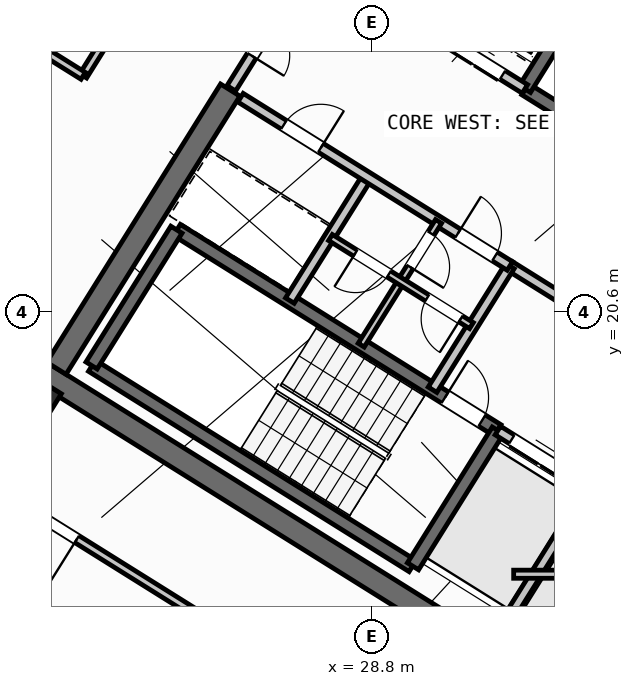
"""IFC4 building model, lengths in metres.
Left out: names, types, materials, properties, quantities, classifications, styles, units other than length and angle.
Written with IfcOpenShell. Run it as: python <this file> out.ifc"""

import sys

from ifc_helpers import new_model, si_unit, direction, frame, frame_2d, origin, origin_2d, place, context, subcontext, project, spatial, rectangle, hollow_rectangle, extrude, source, transform, mapped, element, fill, save


model = new_model("IFC4")
c1 = context("Model", 3, precision=1e-05, world=origin(), true_north=direction((0.0, 1.0)))
c2 = subcontext(c1, "Body", "Model", "MODEL_VIEW")
j1 = project(units=[si_unit("LENGTHUNIT", "METRE"), si_unit("PLANEANGLEUNIT", "RADIAN")], contexts=[c1])
p1 = place(None, origin())
s1 = spatial("IfcSite", under=j1, at=p1, CompositionType="ELEMENT")
p2 = place(p1, origin())
s2 = spatial("IfcBuilding", under=s1, at=p2, CompositionType="ELEMENT")
p3 = place(p2, frame((0.0, 0.0, 295.2)))
s3 = spatial("IfcBuildingStorey", under=s2, at=p3, CompositionType="ELEMENT", Elevation=295.2)
p4 = place(p3, frame((40.531, 24.036, 0.0), z_axis=(0.0, 0.0, 1.0), x_axis=(-0.848048787466, 0.529918157905, 0.0)))
e1 = element("IfcWall", 1, at=p4, inside=s3, PredefinedType="SHEAR", context=c2, shape_type="SweptSolid", body=[
    extrude(rectangle(XDim=13.04, YDim=0.45, at=frame_2d((6.52, 0.0))), origin(), (0.0, 0.0, 1.0), 3.32),
])
p5 = place(p3, frame((33.324, 12.503, 0.0), z_axis=(0.0, 0.0, 1.0), x_axis=(-0.848043529849, 0.529926571782, 0.0)))
e2 = element("IfcWall", 2, at=p5, inside=s3, PredefinedType="SHEAR", context=c2, shape_type="SweptSolid", body=[
    extrude(rectangle(XDim=13.04, YDim=0.45, at=frame_2d((6.52, 0.0))), origin(), (0.0, 0.0, 1.0), 3.32),
])
p6 = place(p3, frame((26.007, 24.976, 0.0), z_axis=(0.0, 0.0, 1.0), x_axis=(-0.529931155655, -0.848040665456, 0.0)))
e3 = element("IfcWall", 3, at=p6, inside=s3, PredefinedType="SHEAR", context=c2, shape_type="SweptSolid", body=[
    extrude(rectangle(XDim=6.475, YDim=0.45, at=frame_2d((3.238, 0.0))), origin(), (0.0, 0.0, 1.0), 3.32),
])
m1 = source(origin(), c2, "Body", "SweptSolid", [
    extrude(hollow_rectangle(XDim=0.7, YDim=0.7, WallThickness=0.028, at=origin_2d()), origin(), (0.0, 0.0, 1.0), 3.6),
])
p7 = place(p3, frame((22.191, 18.87, 0.0), z_axis=(0.0, 0.0, 1.0), x_axis=(-0.848048096156, 0.529919264233, 0.0)))
e4 = element("IfcColumn", 4, at=p7, inside=s3, PredefinedType="COLUMN", context=c2, shape_type="MappedRepresentation", body=[
    mapped(m1, transform((0.0, 0.0, 0.0), scale=1.0)),
])
p8 = place(p3, frame((29.268, 6.429, 0.0), z_axis=(0.0, 0.0, 1.0), x_axis=(-0.848048398186, 0.529918780885, 0.0)))
e5 = element("IfcWall", 5, at=p8, inside=s3, PredefinedType="STANDARD", context=c2, shape_type="SweptSolid", body=[
    extrude(rectangle(XDim=25.188, YDim=0.32, at=frame_2d((12.594, 0.0))), origin(), (0.0, 0.0, 1.0), 3.32),
])
p9 = place(p8, frame((16.362, 0.0, 0.0)))
e6 = element("IfcOpeningElement", 6, at=p9, cuts=e5, PredefinedType="OPENING", context=c2, shape_type="SweptSolid", body=[
    extrude(rectangle(XDim=1.2, YDim=2.15, at=frame_2d((0.6, 1.075))), frame((0.0, 0.17, 0.0), z_axis=(0.0, -1.0, 0.0), x_axis=(1.0, 0.0, 0.0)), (0.0, 0.0, 1.0), 0.34),
])
p10 = place(p8, frame((3.859, 0.0, 0.9)))
e7 = element("IfcOpeningElement", 7, at=p10, cuts=e5, PredefinedType="OPENING", context=c2, shape_type="SweptSolid", body=[
    extrude(rectangle(XDim=1.65, YDim=1.45, at=frame_2d((0.825, 0.725))), frame((0.0, 0.17, 0.0), z_axis=(0.0, -1.0, 0.0), x_axis=(1.0, 0.0, 0.0)), (0.0, 0.0, 1.0), 0.34),
])
p11 = place(p8, frame((10.519, 0.0, 0.9)))
e8 = element("IfcOpeningElement", 8, at=p11, cuts=e5, PredefinedType="OPENING", context=c2, shape_type="SweptSolid", body=[
    extrude(rectangle(XDim=1.65, YDim=1.45, at=frame_2d((0.825, 0.725))), frame((0.0, 0.17, 0.0), z_axis=(0.0, -1.0, 0.0), x_axis=(1.0, 0.0, 0.0)), (0.0, 0.0, 1.0), 0.34),
])
p12 = place(p8, frame((21.156, 0.0, 0.95)))
e9 = element("IfcOpeningElement", 9, at=p12, cuts=e5, PredefinedType="OPENING", context=c2, shape_type="SweptSolid", body=[
    extrude(rectangle(XDim=1.95, YDim=1.35, at=frame_2d((0.975, 0.675))), frame((0.0, 0.17, 0.0), z_axis=(0.0, -1.0, 0.0), x_axis=(1.0, 0.0, 0.0)), (0.0, 0.0, 1.0), 0.34),
])
p13 = place(p3, frame((19.566, 38.434, 0.0), z_axis=(0.0, 0.0, 1.0), x_axis=(0.84804567626, -0.529923136858, 0.0)))
e10 = element("IfcWall", 10, at=p13, inside=s3, PredefinedType="STANDARD", context=c2, shape_type="SweptSolid", body=[
    extrude(rectangle(XDim=25.188, YDim=0.32, at=frame_2d((12.594, 0.0))), origin(), (0.0, 0.0, 1.0), 3.32),
])
p14 = place(p13, frame((3.55, 0.0, 0.0)))
e11 = element("IfcOpeningElement", 11, at=p14, cuts=e10, PredefinedType="OPENING", context=c2, shape_type="SweptSolid", body=[
    extrude(rectangle(XDim=1.05, YDim=2.15, at=frame_2d((0.525, 1.075))), frame((0.0, 0.17, 0.0), z_axis=(0.0, -1.0, 0.0), x_axis=(1.0, 0.0, 0.0)), (0.0, 0.0, 1.0), 0.34),
])
p15 = place(p13, frame((7.349, 0.0, 0.9)))
e12 = element("IfcOpeningElement", 12, at=p15, cuts=e10, PredefinedType="OPENING", context=c2, shape_type="SweptSolid", body=[
    extrude(rectangle(XDim=1.65, YDim=1.45, at=frame_2d((0.825, 0.725))), frame((0.0, 0.17, 0.0), z_axis=(0.0, -1.0, 0.0), x_axis=(1.0, 0.0, 0.0)), (0.0, 0.0, 1.0), 0.34),
])
p16 = place(p13, frame((10.754, 0.0, 1.0)))
e13 = element("IfcOpeningElement", 13, at=p16, cuts=e10, PredefinedType="OPENING", context=c2, shape_type="SweptSolid", body=[
    extrude(rectangle(XDim=0.9, YDim=1.25, at=frame_2d((0.45, 0.625))), frame((0.0, 0.17, 0.0), z_axis=(0.0, -1.0, 0.0), x_axis=(1.0, 0.0, 0.0)), (0.0, 0.0, 1.0), 0.34),
])
p17 = place(p13, frame((15.169, 0.0, 0.95)))
e14 = element("IfcOpeningElement", 14, at=p17, cuts=e10, PredefinedType="OPENING", context=c2, shape_type="SweptSolid", body=[
    extrude(rectangle(XDim=1.95, YDim=1.35, at=frame_2d((0.975, 0.675))), frame((0.0, 0.17, 0.0), z_axis=(0.0, -1.0, 0.0), x_axis=(1.0, 0.0, 0.0)), (0.0, 0.0, 1.0), 0.34),
])
p18 = place(p13, frame((20.869, 0.0, 0.95)))
e15 = element("IfcOpeningElement", 15, at=p18, cuts=e10, PredefinedType="OPENING", context=c2, shape_type="SweptSolid", body=[
    extrude(rectangle(XDim=1.95, YDim=1.35, at=frame_2d((0.975, 0.675))), frame((0.0, 0.17, 0.0), z_axis=(0.0, -1.0, 0.0), x_axis=(1.0, 0.0, 0.0)), (0.0, 0.0, 1.0), 0.34),
])
p19 = place(p3, frame((29.605, 15.581, 0.0), z_axis=(0.0, 0.0, 1.0), x_axis=(-0.848036911448, 0.529937163087, 0.0)))
e16 = element("IfcWall", 16, at=p19, inside=s3, PredefinedType="SHEAR", context=c2, shape_type="SweptSolid", body=[
    extrude(rectangle(XDim=7.46, YDim=0.26, at=frame_2d((3.73, 0.0))), origin(), (0.0, 0.0, 1.0), 3.32),
])
p20 = place(p3, frame((31.28, 18.261, 0.0), z_axis=(0.0, 0.0, 1.0), x_axis=(-0.848051618787, 0.529913626805, 0.0)))
e17 = element("IfcWall", 17, at=p20, inside=s3, PredefinedType="SHEAR", context=c2, shape_type="SweptSolid", body=[
    extrude(rectangle(XDim=7.46, YDim=0.26, at=frame_2d((3.73, 0.0))), origin(), (0.0, 0.0, 1.0), 3.32),
])
p21 = place(p20, frame((0.36, 0.0, 0.0)))
e18 = element("IfcOpeningElement", 18, at=p21, cuts=e17, PredefinedType="OPENING", context=c2, shape_type="SweptSolid", body=[
    extrude(rectangle(XDim=0.86, YDim=2.05, at=frame_2d((0.43, 1.025))), frame((0.0, 0.14, 0.0), z_axis=(0.0, -1.0, 0.0), x_axis=(1.0, 0.0, 0.0)), (0.0, 0.0, 1.0), 0.28),
])
p22 = place(p3, frame((31.288, 18.256, 0.0), z_axis=(0.0, 0.0, 1.0), x_axis=(-0.529943379326, -0.848033026897, 0.0)))
e19 = element("IfcWall", 19, at=p22, inside=s3, PredefinedType="SHEAR", context=c2, shape_type="SweptSolid", body=[
    extrude(rectangle(XDim=3.16, YDim=0.26, at=frame_2d((1.58, 0.0))), origin(), (0.0, 0.0, 1.0), 3.32),
])
p23 = place(p3, frame((24.945, 22.22, 0.0), z_axis=(0.0, 0.0, 1.0), x_axis=(-0.529908658664, -0.84805472316, 0.0)))
e20 = element("IfcWall", 20, at=p23, inside=s3, PredefinedType="SHEAR", context=c2, shape_type="SweptSolid", body=[
    extrude(rectangle(XDim=3.16, YDim=0.26, at=frame_2d((1.58, 0.0))), origin(), (0.0, 0.0, 1.0), 3.32),
])
p24 = place(p3, frame((38.046, 21.108, 0.0), z_axis=(0.0, 0.0, 1.0), x_axis=(-0.848054434086, 0.529909121291, 0.0)))
e21 = element("IfcWall", 21, at=p24, inside=s3, PredefinedType="SHEAR", context=c2, shape_type="SweptSolid", body=[
    extrude(rectangle(XDim=7.33, YDim=0.26, at=frame_2d((3.665, 0.0))), origin(), (0.0, 0.0, 1.0), 3.32),
])
p25 = place(p24, frame((0.22, 0.0, 0.0)))
e22 = element("IfcOpeningElement", 22, at=p25, cuts=e21, PredefinedType="OPENING", context=c2, shape_type="SweptSolid", body=[
    extrude(rectangle(XDim=1.1, YDim=2.1, at=frame_2d((0.55, 1.05))), frame((0.0, 0.14, 0.0), z_axis=(0.0, -1.0, 0.0), x_axis=(1.0, 0.0, 0.0)), (0.0, 0.0, 1.0), 0.28),
])
p26 = place(p3, frame((33.496, 27.677, 0.0), z_axis=(0.0, 0.0, 1.0), x_axis=(-0.529908658664, -0.84805472316, 0.0)))
e23 = element("IfcWall", 23, at=p26, inside=s3, PredefinedType="SHEAR", context=c2, shape_type="SweptSolid", body=[
    extrude(rectangle(XDim=3.16, YDim=0.26, at=frame_2d((1.58, 0.0))), origin(), (0.0, 0.0, 1.0), 3.32),
])
p27 = place(p3, frame((34.933, 15.978, 0.0), z_axis=(0.0, 0.0, 1.0), x_axis=(-0.848055739377, 0.529907032327, 0.0)))
e24 = element("IfcWall", 24, at=p27, inside=s3, PredefinedType="STANDARD", context=c2, shape_type="SweptSolid", body=[
    extrude(rectangle(XDim=4.298, YDim=0.2, at=frame_2d((2.149, 0.0))), origin(), (0.0, 0.0, 1.0), 3.31),
])
p28 = place(p27, frame((0.448, 0.0, 0.0)))
e25 = element("IfcOpeningElement", 25, at=p28, cuts=e24, PredefinedType="OPENING", context=c2, shape_type="SweptSolid", body=[
    extrude(rectangle(XDim=1.3, YDim=2.2, at=frame_2d((0.65, 1.1))), frame((0.0, 0.11, 0.0), z_axis=(0.0, -1.0, 0.0), x_axis=(1.0, 0.0, 0.0)), (0.0, 0.0, 1.0), 0.22),
])
p29 = place(p27, frame((2.523, 0.0, 0.0)))
e26 = element("IfcOpeningElement", 26, at=p29, cuts=e24, PredefinedType="OPENING", context=c2, shape_type="SweptSolid", body=[
    extrude(rectangle(XDim=1.45, YDim=2.25, at=frame_2d((0.725, 1.125))), frame((0.0, 0.11, 0.0), z_axis=(0.0, -1.0, 0.0), x_axis=(1.0, 0.0, 0.0)), (0.0, 0.0, 1.0), 0.22),
])
p30 = place(p3, frame((36.459, 18.421, 0.0), z_axis=(0.0, 0.0, 1.0), x_axis=(-0.848059591691, 0.529900867089, 0.0)))
e27 = element("IfcWall", 27, at=p30, inside=s3, PredefinedType="STANDARD", context=c2, shape_type="SweptSolid", body=[
    extrude(rectangle(XDim=5.818, YDim=0.2, at=frame_2d((2.909, 0.0))), origin(), (0.0, 0.0, 1.0), 3.31),
])
p31 = place(p30, frame((2.598, 0.0, 0.0)))
e28 = element("IfcOpeningElement", 28, at=p31, cuts=e27, PredefinedType="OPENING", context=c2, shape_type="SweptSolid", body=[
    extrude(rectangle(XDim=1.15, YDim=2.1, at=frame_2d((0.575, 1.05))), frame((0.0, 0.11, 0.0), z_axis=(0.0, -1.0, 0.0), x_axis=(1.0, 0.0, 0.0)), (0.0, 0.0, 1.0), 0.22),
])
p32 = place(p3, frame((31.822, 24.998, 0.0), z_axis=(0.0, 0.0, 1.0), x_axis=(-0.848054125777, 0.529909614701, 0.0)))
e29 = element("IfcWall", 29, at=p32, inside=s3, PredefinedType="STANDARD", context=c2, shape_type="SweptSolid", body=[
    extrude(rectangle(XDim=4.668, YDim=0.2, at=frame_2d((2.334, 0.0))), origin(), (0.0, 0.0, 1.0), 3.31),
])
p33 = place(p32, frame((0.52, 0.0, 0.0)))
e30 = element("IfcOpeningElement", 30, at=p33, cuts=e29, PredefinedType="OPENING", context=c2, shape_type="SweptSolid", body=[
    extrude(rectangle(XDim=1.2, YDim=2.15, at=frame_2d((0.6, 1.075))), frame((0.0, 0.11, 0.0), z_axis=(0.0, -1.0, 0.0), x_axis=(1.0, 0.0, 0.0)), (0.0, 0.0, 1.0), 0.22),
])
p34 = place(p32, frame((2.54, 0.0, 0.0)))
e31 = element("IfcOpeningElement", 31, at=p34, cuts=e29, PredefinedType="OPENING", context=c2, shape_type="SweptSolid", body=[
    extrude(rectangle(XDim=1.2, YDim=2.15, at=frame_2d((0.6, 1.075))), frame((0.0, 0.11, 0.0), z_axis=(0.0, -1.0, 0.0), x_axis=(1.0, 0.0, 0.0)), (0.0, 0.0, 1.0), 0.22),
])
p35 = place(p3, frame((33.029, 17.003, 0.0), z_axis=(0.0, 0.0, 1.0), x_axis=(-0.529916267533, -0.848049968695, 0.0)))
e32 = element("IfcWall", 32, at=p35, inside=s3, PredefinedType="STANDARD", context=c2, shape_type="SweptSolid", body=[
    extrude(rectangle(XDim=2.92, YDim=0.2, at=frame_2d((1.46, 0.0))), origin(), (0.0, 0.0, 1.0), 3.31),
])
for number, where, z_axis, x_axis in (
    (33, (31.525, 21.504, 0.0), (0.0, 0.0, 1.0), (-0.53, -0.848, 0.0)),
    (34, (28.71, 23.263, 0.0), (0.0, 0.0, 1.0), (-0.53, -0.848, 0.0)),
):
    element("IfcWall", number, at=place(p3, frame(where, z_axis=z_axis, x_axis=x_axis)), inside=s3, PredefinedType="STANDARD", context=c2, shape_type="SweptSolid", body=[
        extrude(rectangle(XDim=2.88, YDim=0.2, at=frame_2d((1.44, 0.0))), origin(), (0.0, 0.0, 1.0), 3.31),
    ])
p36 = place(p3, frame((31.525, 21.504, 0.0), z_axis=(0.0, 0.0, 1.0), x_axis=(-0.848042066329, 0.529928913853, 0.0)))
e35 = element("IfcWall", 35, at=p36, inside=s3, PredefinedType="STANDARD", context=c2, shape_type="SweptSolid", body=[
    extrude(rectangle(XDim=6.268, YDim=0.2, at=frame_2d((3.134, 0.0))), origin(), (0.0, 0.0, 1.0), 3.31),
])
p37 = place(p36, frame((4.4, 0.0, 0.0)))
e36 = element("IfcOpeningElement", 36, at=p37, cuts=e35, PredefinedType="OPENING", context=c2, shape_type="SweptSolid", body=[
    extrude(rectangle(XDim=0.86, YDim=2.05, at=frame_2d((0.43, 1.025))), frame((0.0, 0.11, 0.0), z_axis=(0.0, -1.0, 0.0), x_axis=(1.0, 0.0, 0.0)), (0.0, 0.0, 1.0), 0.22),
])
p38 = place(p36, frame((0.35, 0.0, 0.0)))
e37 = element("IfcOpeningElement", 37, at=p38, cuts=e35, PredefinedType="OPENING", context=c2, shape_type="SweptSolid", body=[
    extrude(rectangle(XDim=0.86, YDim=2.05, at=frame_2d((0.43, 1.025))), frame((0.0, 0.11, 0.0), z_axis=(0.0, -1.0, 0.0), x_axis=(1.0, 0.0, 0.0)), (0.0, 0.0, 1.0), 0.22),
])
p39 = place(p3, frame((30.117, 22.384, 0.0), z_axis=(0.0, 0.0, 1.0), x_axis=(-0.529951914384, -0.848027693204, 0.0)))
e38 = element("IfcWall", 38, at=p39, inside=s3, PredefinedType="PLUMBINGWALL", context=c2, shape_type="SweptSolid", body=[
    extrude(rectangle(XDim=1.4, YDim=0.14, at=frame_2d((0.7, 0.0))), origin(), (0.0, 0.0, 1.0), 3.31),
])
p40 = place(p39, frame((0.28, 0.0, 0.0)))
e39 = element("IfcOpeningElement", 39, at=p40, cuts=e38, PredefinedType="OPENING", context=c2, shape_type="SweptSolid", body=[
    extrude(rectangle(XDim=0.78, YDim=2.05, at=frame_2d((0.39, 1.025))), frame((0.0, 0.08, 0.0), z_axis=(0.0, -1.0, 0.0), x_axis=(1.0, 0.0, 0.0)), (0.0, 0.0, 1.0), 0.16),
])
p41 = place(p3, frame((29.375, 21.196, 0.0), z_axis=(0.0, 0.0, 1.0), x_axis=(-0.529865479138, -0.848081702443, 0.0)))
e40 = element("IfcWall", 40, at=p41, inside=s3, PredefinedType="PLUMBINGWALL", context=c2, shape_type="SweptSolid", body=[
    extrude(rectangle(XDim=1.48, YDim=0.14, at=frame_2d((0.74, 0.0))), origin(), (0.0, 0.0, 1.0), 3.31),
])
p42 = place(p3, frame((30.766, 20.327, 0.0), z_axis=(0.0, 0.0, 1.0), x_axis=(-0.848052663127, 0.529911955482, 0.0)))
e41 = element("IfcWall", 41, at=p42, inside=s3, PredefinedType="PLUMBINGWALL", context=c2, shape_type="SweptSolid", body=[
    extrude(rectangle(XDim=3.28, YDim=0.14, at=frame_2d((1.64, 0.0))), origin(), (0.0, 0.0, 1.0), 3.31),
])
p43 = place(p42, frame((0.25, 0.0, 0.0)))
e42 = element("IfcOpeningElement", 42, at=p43, cuts=e41, PredefinedType="OPENING", context=c2, shape_type="SweptSolid", body=[
    extrude(rectangle(XDim=0.78, YDim=2.05, at=frame_2d((0.39, 1.025))), frame((0.0, 0.08, 0.0), z_axis=(0.0, -1.0, 0.0), x_axis=(1.0, 0.0, 0.0)), (0.0, 0.0, 1.0), 0.16),
])
p44 = place(p42, frame((1.92, 0.0, 0.0)))
e43 = element("IfcOpeningElement", 43, at=p44, cuts=e41, PredefinedType="OPENING", context=c2, shape_type="SweptSolid", body=[
    extrude(rectangle(XDim=0.78, YDim=2.05, at=frame_2d((0.39, 1.025))), frame((0.0, 0.08, 0.0), z_axis=(0.0, -1.0, 0.0), x_axis=(1.0, 0.0, 0.0)), (0.0, 0.0, 1.0), 0.16),
])
p45 = place(p3, frame((27.596, 27.52, 0.0), z_axis=(0.0, 0.0, 1.0), x_axis=(-0.529865479138, -0.848081702443, 0.0)))
e44 = element("IfcWall", 44, at=p45, inside=s3, PredefinedType="STANDARD", context=c2, shape_type="SweptSolid", body=[
    extrude(rectangle(XDim=2.96, YDim=0.2, at=frame_2d((1.48, 0.0))), origin(), (0.0, 0.0, 1.0), 3.31),
])
p46 = place(p45, frame((0.7, 0.0, 0.0)))
e45 = element("IfcOpeningElement", 45, at=p46, cuts=e44, PredefinedType="OPENING", context=c2, shape_type="SweptSolid", body=[
    extrude(rectangle(XDim=1.5, YDim=2.15, at=frame_2d((0.75, 1.075))), frame((0.0, 0.11, 0.0), z_axis=(0.0, -1.0, 0.0), x_axis=(1.0, 0.0, 0.0)), (0.0, 0.0, 1.0), 0.22),
])
p47 = place(p3, frame((27.953, 33.016, 0.0), z_axis=(0.0, 0.0, 1.0), x_axis=(-0.529903001606, -0.848058257957, 0.0)))
e46 = element("IfcWall", 46, at=p47, inside=s3, PredefinedType="PARTITIONING", context=c2, shape_type="SweptSolid", body=[
    extrude(rectangle(XDim=9.15, YDim=0.16, at=frame_2d((4.575, 0.0))), origin(), (0.0, 0.0, 1.0), 3.31),
])
p48 = place(p3, frame((23.104, 25.256, 0.0), z_axis=(0.0, 0.0, 1.0), x_axis=(-0.848043444964, 0.529926707624, 0.0)))
e47 = element("IfcWall", 47, at=p48, inside=s3, PredefinedType="PARTITIONING", context=c2, shape_type="SweptSolid", body=[
    extrude(rectangle(XDim=10.33, YDim=0.16, at=frame_2d((5.165, 0.0))), origin(), (0.0, 0.0, 1.0), 3.31),
])
p49 = place(p48, frame((1.395, 0.0, 0.0)))
e48 = element("IfcOpeningElement", 48, at=p49, cuts=e47, PredefinedType="OPENING", context=c2, shape_type="SweptSolid", body=[
    extrude(rectangle(XDim=1.0, YDim=2.1, at=frame_2d((0.5, 1.05))), frame((0.0, 0.09, 0.0), z_axis=(0.0, -1.0, 0.0), x_axis=(1.0, 0.0, 0.0)), (0.0, 0.0, 1.0), 0.18),
])
p50 = place(p48, frame((7.904, 0.0, 0.0)))
e49 = element("IfcOpeningElement", 49, at=p50, cuts=e47, PredefinedType="OPENING", context=c2, shape_type="SweptSolid", body=[
    extrude(rectangle(XDim=1.0, YDim=2.1, at=frame_2d((0.5, 1.05))), frame((0.0, 0.09, 0.0), z_axis=(0.0, -1.0, 0.0), x_axis=(1.0, 0.0, 0.0)), (0.0, 0.0, 1.0), 0.18),
])
p51 = place(p3, frame((32.164, 10.374, 0.0), z_axis=(0.0, 0.0, 1.0), x_axis=(-0.848044107957, 0.529925646633, 0.0)))
e50 = element("IfcWall", 50, at=p51, inside=s3, PredefinedType="PARTITIONING", context=c2, shape_type="SweptSolid", body=[
    extrude(rectangle(XDim=15.57, YDim=0.16, at=frame_2d((7.785, 0.0))), origin(), (0.0, 0.0, 1.0), 3.31),
])
p52 = place(p51, frame((10.83, 0.0, 0.0)))
e51 = element("IfcOpeningElement", 51, at=p52, cuts=e50, PredefinedType="OPENING", context=c2, shape_type="SweptSolid", body=[
    extrude(rectangle(XDim=1.0, YDim=2.1, at=frame_2d((0.5, 1.05))), frame((0.0, 0.09, 0.0), z_axis=(0.0, -1.0, 0.0), x_axis=(1.0, 0.0, 0.0)), (0.0, 0.0, 1.0), 0.18),
])
p53 = place(p3, frame((29.72, 8.859, 0.0), z_axis=(0.0, 0.0, 1.0), x_axis=(-0.848049134363, 0.529917602752, 0.0)))
e52 = element("IfcWall", 52, at=p53, inside=s3, PredefinedType="PLUMBINGWALL", context=c2, shape_type="SweptSolid", body=[
    extrude(rectangle(XDim=14.3, YDim=0.14, at=frame_2d((7.15, 0.0))), origin(), (0.0, 0.0, 1.0), 3.31),
])
p54 = place(p53, frame((9.57, 0.0, 0.0)))
e53 = element("IfcOpeningElement", 53, at=p54, cuts=e52, PredefinedType="OPENING", context=c2, shape_type="SweptSolid", body=[
    extrude(rectangle(XDim=0.92, YDim=2.08, at=frame_2d((0.46, 1.04))), frame((0.0, 0.08, 0.0), z_axis=(0.0, -1.0, 0.0), x_axis=(1.0, 0.0, 0.0)), (0.0, 0.0, 1.0), 0.16),
])
p55 = place(p3, frame((31.6, 15.42, 0.0), z_axis=(0.0, 0.0, 1.0), x_axis=(1.0, 0.0, 0.0)))
e54 = element("IfcWall", 54, at=p55, inside=s3, PredefinedType="PARTITIONING", context=c2, shape_type="SweptSolid", body=[
    extrude(rectangle(XDim=2.984, YDim=0.16, at=frame_2d((1.492, 0.0))), origin(), (0.0, 0.0, 1.0), 3.31),
])
m2 = source(origin(), c2, "Body", "SweptSolid", [
    extrude(rectangle(XDim=0.86, YDim=2.05, at=frame_2d((0.43, 1.025))), frame((0.0, 0.025, 0.0), z_axis=(0.0, -1.0, 0.0), x_axis=(1.0, 0.0, 0.0)), (0.0, 0.0, 1.0), 0.05),
])
p56 = place(p21, frame((0.86, 0.0, 0.0), z_axis=(0.0, 0.0, 1.0), x_axis=(-1.0, 0.0, 0.0)))
e55 = element("IfcDoor", 55, at=p56, inside=s3, OperationType="SINGLE_SWING_LEFT", PredefinedType="DOOR", context=c2, shape_type="MappedRepresentation", body=[
    mapped(m2, transform((0.0, 0.0, 0.0), scale=1.0)),
])
fill(e18, e55)
m3 = source(origin(), c2, "Body", "SweptSolid", [
    extrude(rectangle(XDim=1.45, YDim=2.25, at=frame_2d((0.725, 1.125))), frame((0.0, 0.025, 0.0), z_axis=(0.0, -1.0, 0.0), x_axis=(1.0, 0.0, 0.0)), (0.0, 0.0, 1.0), 0.05),
])
p57 = place(p29, origin())
e56 = element("IfcDoor", 56, at=p57, inside=s3, OperationType="DOUBLE_DOOR_SLIDING", PredefinedType="DOOR", context=c2, shape_type="MappedRepresentation", body=[
    mapped(m3, transform((0.0, 0.0, 0.0), scale=1.0)),
])
fill(e26, e56)
m4 = source(origin(), c2, "Body", "SweptSolid", [
    extrude(rectangle(XDim=1.2, YDim=2.15, at=frame_2d((0.6, 1.075))), frame((0.0, 0.025, 0.0), z_axis=(0.0, -1.0, 0.0), x_axis=(1.0, 0.0, 0.0)), (0.0, 0.0, 1.0), 0.05),
])
p58 = place(p33, origin())
e57 = element("IfcDoor", 57, at=p58, inside=s3, OperationType="DOUBLE_DOOR_SLIDING", PredefinedType="DOOR", context=c2, shape_type="MappedRepresentation", body=[
    mapped(m4, transform((0.0, 0.0, 0.0), scale=1.0)),
])
fill(e30, e57)
p59 = place(p37, frame((0.86, 0.0, 0.0), z_axis=(0.0, 0.0, 1.0), x_axis=(-1.0, 0.0, 0.0)))
e58 = element("IfcDoor", 58, at=p59, inside=s3, OperationType="SINGLE_SWING_RIGHT", PredefinedType="DOOR", context=c2, shape_type="MappedRepresentation", body=[
    mapped(m2, transform((0.0, 0.0, 0.0), scale=1.0)),
])
fill(e36, e58)
p60 = place(p38, frame((0.86, 0.0, 0.0), z_axis=(0.0, 0.0, 1.0), x_axis=(-1.0, 0.0, 0.0)))
e59 = element("IfcDoor", 59, at=p60, inside=s3, OperationType="SINGLE_SWING_LEFT", PredefinedType="DOOR", context=c2, shape_type="MappedRepresentation", body=[
    mapped(m2, transform((0.0, 0.0, 0.0), scale=1.0)),
])
fill(e37, e59)
m5 = source(origin(), c2, "Body", "SweptSolid", [
    extrude(rectangle(XDim=0.78, YDim=2.05, at=frame_2d((0.39, 1.025))), frame((0.0, 0.025, 0.0), z_axis=(0.0, -1.0, 0.0), x_axis=(1.0, 0.0, 0.0)), (0.0, 0.0, 1.0), 0.05),
])
p61 = place(p40, origin())
e60 = element("IfcDoor", 60, at=p61, inside=s3, OperationType="SINGLE_SWING_RIGHT", PredefinedType="DOOR", context=c2, shape_type="MappedRepresentation", body=[
    mapped(m5, transform((0.0, 0.0, 0.0), scale=1.0)),
])
fill(e39, e60)
p62 = place(p43, origin())
e61 = element("IfcDoor", 61, at=p62, inside=s3, OperationType="SINGLE_SWING_LEFT", PredefinedType="DOOR", context=c2, shape_type="MappedRepresentation", body=[
    mapped(m5, transform((0.0, 0.0, 0.0), scale=1.0)),
])
fill(e42, e61)
p63 = place(p44, origin())
e62 = element("IfcDoor", 62, at=p63, inside=s3, OperationType="SINGLE_SWING_RIGHT", PredefinedType="DOOR", context=c2, shape_type="MappedRepresentation", body=[
    mapped(m5, transform((0.0, 0.0, 0.0), scale=1.0)),
])
fill(e43, e62)
m6 = source(origin(), c2, "Body", "SweptSolid", [
    extrude(rectangle(XDim=1.5, YDim=2.15, at=frame_2d((0.75, 1.075))), frame((0.0, 0.025, 0.0), z_axis=(0.0, -1.0, 0.0), x_axis=(1.0, 0.0, 0.0)), (0.0, 0.0, 1.0), 0.05),
])
p64 = place(p46, origin())
e63 = element("IfcDoor", 63, at=p64, inside=s3, OperationType="DOUBLE_DOOR_SINGLE_SWING", PredefinedType="DOOR", context=c2, shape_type="MappedRepresentation", body=[
    mapped(m6, transform((0.0, 0.0, 0.0), scale=1.0)),
])
fill(e45, e63)
m7 = source(origin(), c2, "Body", "SweptSolid", [
    extrude(rectangle(XDim=1.0, YDim=2.1, at=frame_2d((0.5, 1.05))), frame((0.0, 0.025, 0.0), z_axis=(0.0, -1.0, 0.0), x_axis=(1.0, 0.0, 0.0)), (0.0, 0.0, 1.0), 0.05),
])
p65 = place(p52, origin())
e64 = element("IfcDoor", 64, at=p65, inside=s3, OperationType="SINGLE_SWING_LEFT", PredefinedType="DOOR", context=c2, shape_type="MappedRepresentation", body=[
    mapped(m7, transform((0.0, 0.0, 0.0), scale=1.0)),
])
fill(e51, e64)
save(model, sys.argv[1])
